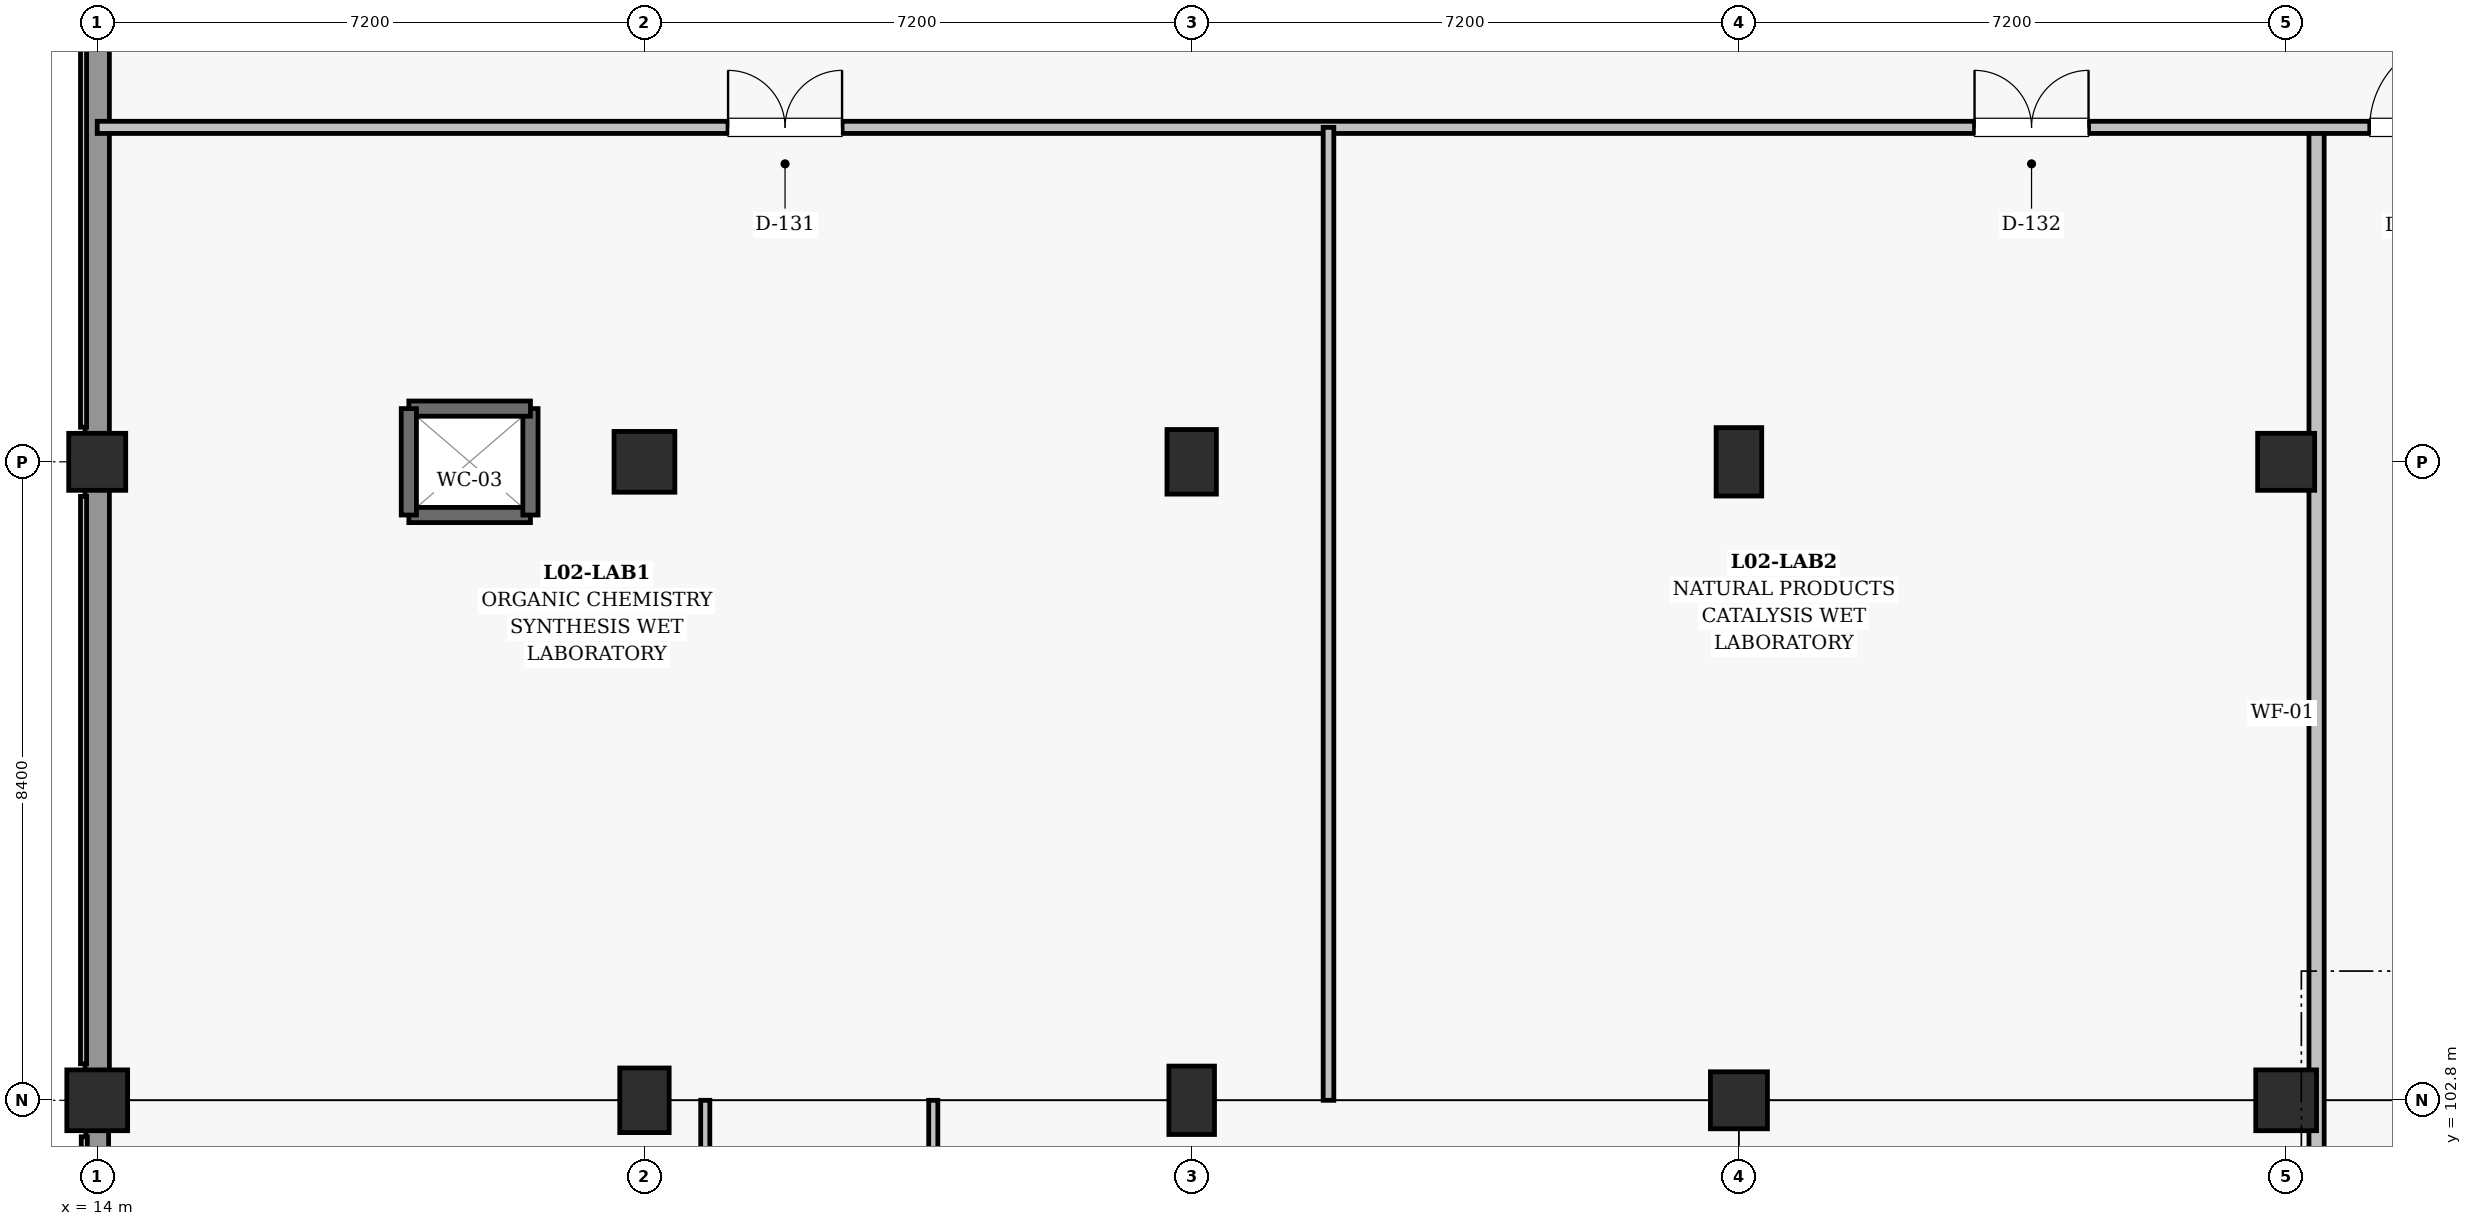
"""IFC4 building model, lengths in metres.
Left out: names, types, materials, properties, quantities, classifications, styles, units other than length and angle.
Written with IfcOpenShell. Run it as: python <this file> out.ifc"""

import sys

from ifc_helpers import new_model, si_unit, direction, frame, frame_2d, origin, origin_2d, place, context, subcontext, project, spatial, rectangle, extrude, element, fill, save


model = new_model("IFC4")
c1 = context("Model", 3, precision=1e-05, world=origin(), true_north=direction((0.0, 1.0)))
c2 = subcontext(c1, "Body", "Model", "MODEL_VIEW")
j1 = project(units=[si_unit("LENGTHUNIT", "METRE"), si_unit("PLANEANGLEUNIT", "RADIAN")], contexts=[c1])
p1 = place(None, origin())
s1 = spatial("IfcSite", under=j1, at=p1, CompositionType="ELEMENT")
p2 = place(p1, origin())
s2 = spatial("IfcBuilding", under=s1, at=p2, CompositionType="ELEMENT")
p3 = place(p2, frame((0.0, 0.0, 9.9)))
s3 = spatial("IfcBuildingStorey", under=s2, at=p3, CompositionType="ELEMENT", Elevation=9.9)
p4 = place(p3, frame((14.0, 102.8, 0.0), z_axis=(0.0, 0.0, 1.0), x_axis=(1.0, 0.0, 0.0)))
e1 = element("IfcColumn", 1, at=p4, inside=s3, PredefinedType="COLUMN", context=c2, shape_type="SweptSolid", body=[
    extrude(rectangle(XDim=0.8, YDim=0.8, at=origin_2d()), origin(), (0.0, 0.0, 1.0), 4.5),
])
p5 = place(p3, frame((14.0, 111.2, 0.0), z_axis=(0.0, 0.0, 1.0), x_axis=(1.0, 0.0, 0.0)))
e2 = element("IfcColumn", 2, at=p5, inside=s3, PredefinedType="COLUMN", context=c2, shape_type="SweptSolid", body=[
    extrude(rectangle(XDim=0.75, YDim=0.75, at=origin_2d()), origin(), (0.0, 0.0, 1.0), 4.5),
])
p6 = place(p3, frame((21.2, 102.8, 0.0), z_axis=(0.0, 0.0, 1.0), x_axis=(1.0, 0.0, 0.0)))
e3 = element("IfcColumn", 3, at=p6, inside=s3, PredefinedType="COLUMN", context=c2, shape_type="SweptSolid", body=[
    extrude(rectangle(XDim=0.65, YDim=0.85, at=origin_2d()), origin(), (0.0, 0.0, 1.0), 4.5),
])
p7 = place(p3, frame((21.2, 111.2, 0.0), z_axis=(0.0, 0.0, 1.0), x_axis=(1.0, 0.0, 0.0)))
e4 = element("IfcColumn", 4, at=p7, inside=s3, PredefinedType="COLUMN", context=c2, shape_type="SweptSolid", body=[
    extrude(rectangle(XDim=0.8, YDim=0.8, at=origin_2d()), origin(), (0.0, 0.0, 1.0), 4.5),
])
p8 = place(p3, frame((28.4, 102.8, 0.0), z_axis=(0.0, 0.0, 1.0), x_axis=(1.0, 0.0, 0.0)))
e5 = element("IfcColumn", 5, at=p8, inside=s3, PredefinedType="COLUMN", context=c2, shape_type="SweptSolid", body=[
    extrude(rectangle(XDim=0.6, YDim=0.9, at=origin_2d()), origin(), (0.0, 0.0, 1.0), 4.5),
])
p9 = place(p3, frame((28.4, 111.2, 0.0), z_axis=(0.0, 0.0, 1.0), x_axis=(1.0, 0.0, 0.0)))
e6 = element("IfcColumn", 6, at=p9, inside=s3, PredefinedType="COLUMN", context=c2, shape_type="SweptSolid", body=[
    extrude(rectangle(XDim=0.65, YDim=0.85, at=origin_2d()), origin(), (0.0, 0.0, 1.0), 4.5),
])
p10 = place(p3, frame((35.6, 102.8, 0.0), z_axis=(0.0, 0.0, 1.0), x_axis=(1.0, 0.0, 0.0)))
e7 = element("IfcColumn", 7, at=p10, inside=s3, PredefinedType="COLUMN", context=c2, shape_type="SweptSolid", body=[
    extrude(rectangle(XDim=0.75, YDim=0.75, at=origin_2d()), origin(), (0.0, 0.0, 1.0), 4.5),
])
p11 = place(p3, frame((35.6, 111.2, 0.0), z_axis=(0.0, 0.0, 1.0), x_axis=(1.0, 0.0, 0.0)))
e8 = element("IfcColumn", 8, at=p11, inside=s3, PredefinedType="COLUMN", context=c2, shape_type="SweptSolid", body=[
    extrude(rectangle(XDim=0.6, YDim=0.9, at=origin_2d()), origin(), (0.0, 0.0, 1.0), 4.5),
])
p12 = place(p3, frame((42.8, 102.8, 0.0), z_axis=(0.0, 0.0, 1.0), x_axis=(1.0, 0.0, 0.0)))
e9 = element("IfcColumn", 9, at=p12, inside=s3, PredefinedType="COLUMN", context=c2, shape_type="SweptSolid", body=[
    extrude(rectangle(XDim=0.8, YDim=0.8, at=origin_2d()), origin(), (0.0, 0.0, 1.0), 4.5),
])
p13 = place(p3, frame((42.8, 111.2, 0.0), z_axis=(0.0, 0.0, 1.0), x_axis=(1.0, 0.0, 0.0)))
e10 = element("IfcColumn", 10, at=p13, inside=s3, PredefinedType="COLUMN", context=c2, shape_type="SweptSolid", body=[
    extrude(rectangle(XDim=0.75, YDim=0.75, at=origin_2d()), origin(), (0.0, 0.0, 1.0), 4.5),
])
p14 = place(p3, frame((14.0, 103.18, 0.0), z_axis=(0.0, 0.0, 1.0), x_axis=(0.0, 1.0, 0.0)))
e11 = element("IfcWall", 11, at=p14, inside=s3, PredefinedType="SOLIDWALL", context=c2, shape_type="SweptSolid", body=[
    extrude(rectangle(XDim=7.665, YDim=0.32, at=frame_2d((3.833, 0.0))), origin(), (0.0, 0.0, 1.0), 3.355),
])
p15 = place(p3, frame((14.0, 111.555, 0.0), z_axis=(0.0, 0.0, 1.0), x_axis=(0.0, 1.0, 0.0)))
e12 = element("IfcWall", 12, at=p15, inside=s3, PredefinedType="SOLIDWALL", context=c2, shape_type="SweptSolid", body=[
    extrude(rectangle(XDim=7.69, YDim=0.32, at=frame_2d((3.845, 0.0))), origin(), (0.0, 0.0, 1.0), 3.405),
])
p16 = place(p3, frame((14.0, 94.73, 0.0), z_axis=(0.0, 0.0, 1.0), x_axis=(0.0, 1.0, 0.0)))
e13 = element("IfcWall", 13, at=p16, inside=s3, PredefinedType="SOLIDWALL", context=c2, shape_type="SweptSolid", body=[
    extrude(rectangle(XDim=7.69, YDim=0.3, at=frame_2d((3.845, 0.0))), origin(), (0.0, 0.0, 1.0), 3.355),
])
p17 = place(p3, frame((18.1, 110.5, 0.0), z_axis=(0.0, 0.0, 1.0), x_axis=(1.0, 0.0, 0.0)))
e14 = element("IfcWall", 14, at=p17, inside=s3, PredefinedType="SHEAR", context=c2, shape_type="SweptSolid", body=[
    extrude(rectangle(XDim=1.6, YDim=0.2, at=frame_2d((0.8, 0.0))), origin(), (0.0, 0.0, 1.0), 4.14),
])
p18 = place(p3, frame((19.7, 110.5, 0.0), z_axis=(0.0, 0.0, 1.0), x_axis=(0.0, 1.0, 0.0)))
e15 = element("IfcWall", 15, at=p18, inside=s3, PredefinedType="SHEAR", context=c2, shape_type="SweptSolid", body=[
    extrude(rectangle(XDim=1.4, YDim=0.2, at=frame_2d((0.7, 0.0))), origin(), (0.0, 0.0, 1.0), 4.14),
])
p19 = place(p3, frame((19.7, 111.9, 0.0), z_axis=(0.0, 0.0, 1.0), x_axis=(-1.0, 0.0, 0.0)))
e16 = element("IfcWall", 16, at=p19, inside=s3, PredefinedType="SHEAR", context=c2, shape_type="SweptSolid", body=[
    extrude(rectangle(XDim=1.6, YDim=0.2, at=frame_2d((0.8, 0.0))), origin(), (0.0, 0.0, 1.0), 4.14),
])
p20 = place(p3, frame((18.1, 111.9, 0.0), z_axis=(0.0, 0.0, 1.0), x_axis=(0.0, -1.0, 0.0)))
e17 = element("IfcWall", 17, at=p20, inside=s3, PredefinedType="SHEAR", context=c2, shape_type="SweptSolid", body=[
    extrude(rectangle(XDim=1.4, YDim=0.2, at=frame_2d((0.7, 0.0))), origin(), (0.0, 0.0, 1.0), 4.14),
])
p21 = place(p3, frame((43.2, 100.2, 0.0), z_axis=(0.0, 0.0, 1.0), x_axis=(0.0, 1.0, 0.0)))
e18 = element("IfcWall", 18, at=p21, inside=s3, PredefinedType="SOLIDWALL", context=c2, shape_type="SweptSolid", body=[
    extrude(rectangle(XDim=15.4, YDim=0.2, at=frame_2d((7.7, 0.0))), origin(), (0.0, 0.0, 1.0), 2.96),
])
p22 = place(p21, frame((0.45, 0.0, 0.0)))
e19 = element("IfcOpeningElement", 19, at=p22, cuts=e18, PredefinedType="OPENING", context=c2, shape_type="SweptSolid", body=[
    extrude(rectangle(XDim=1.1, YDim=2.15, at=frame_2d((0.55, 1.075))), frame((0.0, 0.11, 0.0), z_axis=(0.0, -1.0, 0.0), x_axis=(1.0, 0.0, 0.0)), (0.0, 0.0, 1.0), 0.22),
])
p23 = place(p3, frame((14.0, 115.6, 0.0), z_axis=(0.0, 0.0, 1.0), x_axis=(1.0, 0.0, 0.0)))
e20 = element("IfcWall", 20, at=p23, inside=s3, PredefinedType="PARTITIONING", context=c2, shape_type="SweptSolid", body=[
    extrude(rectangle(XDim=100.8, YDim=0.16, at=frame_2d((50.4, 0.0))), origin(), (0.0, 0.0, 1.0), 2.96),
])
p24 = place(p23, frame((29.9, 0.0, 0.0)))
e21 = element("IfcOpeningElement", 21, at=p24, cuts=e20, PredefinedType="OPENING", context=c2, shape_type="SweptSolid", body=[
    extrude(rectangle(XDim=1.18, YDim=2.2, at=frame_2d((0.59, 1.1))), frame((0.0, 0.09, 0.0), z_axis=(0.0, -1.0, 0.0), x_axis=(1.0, 0.0, 0.0)), (0.0, 0.0, 1.0), 0.18),
])
p25 = place(p23, frame((8.3, 0.0, 0.0)))
e22 = element("IfcOpeningElement", 22, at=p25, cuts=e20, PredefinedType="OPENING", context=c2, shape_type="SweptSolid", body=[
    extrude(rectangle(XDim=1.5, YDim=2.25, at=frame_2d((0.75, 1.125))), frame((0.0, 0.09, 0.0), z_axis=(0.0, -1.0, 0.0), x_axis=(1.0, 0.0, 0.0)), (0.0, 0.0, 1.0), 0.18),
])
p26 = place(p23, frame((24.7, 0.0, 0.0)))
e23 = element("IfcOpeningElement", 23, at=p26, cuts=e20, PredefinedType="OPENING", context=c2, shape_type="SweptSolid", body=[
    extrude(rectangle(XDim=1.5, YDim=2.25, at=frame_2d((0.75, 1.125))), frame((0.0, 0.09, 0.0), z_axis=(0.0, -1.0, 0.0), x_axis=(1.0, 0.0, 0.0)), (0.0, 0.0, 1.0), 0.18),
])
p27 = place(p23, frame((46.6, 0.0, 0.0)))
e24 = element("IfcOpeningElement", 24, at=p27, cuts=e20, PredefinedType="OPENING", context=c2, shape_type="SweptSolid", body=[
    extrude(rectangle(XDim=1.45, YDim=2.2, at=frame_2d((0.725, 1.1))), frame((0.0, 0.09, 0.0), z_axis=(0.0, -1.0, 0.0), x_axis=(1.0, 0.0, 0.0)), (0.0, 0.0, 1.0), 0.18),
])
p28 = place(p23, frame((70.2, 0.0, 0.0)))
e25 = element("IfcOpeningElement", 25, at=p28, cuts=e20, PredefinedType="OPENING", context=c2, shape_type="SweptSolid", body=[
    extrude(rectangle(XDim=1.5, YDim=2.25, at=frame_2d((0.75, 1.125))), frame((0.0, 0.09, 0.0), z_axis=(0.0, -1.0, 0.0), x_axis=(1.0, 0.0, 0.0)), (0.0, 0.0, 1.0), 0.18),
])
p29 = place(p23, frame((89.8, 0.0, 0.0)))
e26 = element("IfcOpeningElement", 26, at=p29, cuts=e20, PredefinedType="OPENING", context=c2, shape_type="SweptSolid", body=[
    extrude(rectangle(XDim=1.5, YDim=2.25, at=frame_2d((0.75, 1.125))), frame((0.0, 0.09, 0.0), z_axis=(0.0, -1.0, 0.0), x_axis=(1.0, 0.0, 0.0)), (0.0, 0.0, 1.0), 0.18),
])
p30 = place(p3, frame((30.2, 102.8, 0.0), z_axis=(0.0, 0.0, 1.0), x_axis=(0.0, 1.0, 0.0)))
e27 = element("IfcWall", 27, at=p30, inside=s3, PredefinedType="PARTITIONING", context=c2, shape_type="SweptSolid", body=[
    extrude(rectangle(XDim=12.8, YDim=0.14, at=frame_2d((6.4, 0.0))), origin(), (0.0, 0.0, 1.0), 3.41),
])
p31 = place(p3, frame((25.0, 36.0, 0.0), z_axis=(0.0, 0.0, 1.0), x_axis=(0.0, 1.0, 0.0)))
e28 = element("IfcWall", 28, at=p31, inside=s3, PredefinedType="PARTITIONING", context=c2, shape_type="SweptSolid", body=[
    extrude(rectangle(XDim=66.8, YDim=0.12, at=frame_2d((33.4, 0.0))), origin(), (0.0, 0.0, 1.0), 3.38),
])
p32 = place(p31, frame((10.0, 0.0, 0.0)))
e29 = element("IfcOpeningElement", 29, at=p32, cuts=e28, PredefinedType="OPENING", context=c2, shape_type="SweptSolid", body=[
    extrude(rectangle(XDim=1.18, YDim=2.2, at=frame_2d((0.59, 1.1))), frame((0.0, 0.07, 0.0), z_axis=(0.0, -1.0, 0.0), x_axis=(1.0, 0.0, 0.0)), (0.0, 0.0, 1.0), 0.14),
])
p33 = place(p31, frame((30.5, 0.0, 0.0)))
e30 = element("IfcOpeningElement", 30, at=p33, cuts=e28, PredefinedType="OPENING", context=c2, shape_type="SweptSolid", body=[
    extrude(rectangle(XDim=1.25, YDim=2.2, at=frame_2d((0.625, 1.1))), frame((0.0, 0.07, 0.0), z_axis=(0.0, -1.0, 0.0), x_axis=(1.0, 0.0, 0.0)), (0.0, 0.0, 1.0), 0.14),
])
p34 = place(p31, frame((53.7, 0.0, 0.0)))
e31 = element("IfcOpeningElement", 31, at=p34, cuts=e28, PredefinedType="OPENING", context=c2, shape_type="SweptSolid", body=[
    extrude(rectangle(XDim=1.35, YDim=2.2, at=frame_2d((0.675, 1.1))), frame((0.0, 0.07, 0.0), z_axis=(0.0, -1.0, 0.0), x_axis=(1.0, 0.0, 0.0)), (0.0, 0.0, 1.0), 0.14),
])
p35 = place(p3, frame((22.0, 63.2, 0.0), z_axis=(0.0, 0.0, 1.0), x_axis=(0.0, 1.0, 0.0)))
e32 = element("IfcWall", 32, at=p35, inside=s3, PredefinedType="PARTITIONING", context=c2, shape_type="SweptSolid", body=[
    extrude(rectangle(XDim=39.6, YDim=0.12, at=frame_2d((19.8, 0.0))), origin(), (0.0, 0.0, 1.0), 3.38),
])
p36 = place(p35, frame((11.3, 0.0, 0.0)))
e33 = element("IfcOpeningElement", 33, at=p36, cuts=e32, PredefinedType="OPENING", context=c2, shape_type="SweptSolid", body=[
    extrude(rectangle(XDim=1.25, YDim=2.2, at=frame_2d((0.625, 1.1))), frame((0.0, 0.07, 0.0), z_axis=(0.0, -1.0, 0.0), x_axis=(1.0, 0.0, 0.0)), (0.0, 0.0, 1.0), 0.14),
])
p37 = place(p35, frame((26.3, 0.0, 0.0)))
e34 = element("IfcOpeningElement", 34, at=p37, cuts=e32, PredefinedType="OPENING", context=c2, shape_type="SweptSolid", body=[
    extrude(rectangle(XDim=1.35, YDim=2.2, at=frame_2d((0.675, 1.1))), frame((0.0, 0.07, 0.0), z_axis=(0.0, -1.0, 0.0), x_axis=(1.0, 0.0, 0.0)), (0.0, 0.0, 1.0), 0.14),
])
p38 = place(p24, origin())
e35 = element("IfcDoor", 35, at=p38, inside=s3, OperationType="SINGLE_SWING_RIGHT", PredefinedType="DOOR", context=c2, shape_type="SweptSolid", body=[
    extrude(rectangle(XDim=1.18, YDim=2.2, at=frame_2d((0.59, 1.1))), frame((0.0, 0.025, 0.0), z_axis=(0.0, -1.0, 0.0), x_axis=(1.0, 0.0, 0.0)), (0.0, 0.0, 1.0), 0.05),
])
fill(e21, e35)
p39 = place(p25, origin())
e36 = element("IfcDoor", 36, at=p39, inside=s3, OperationType="DOUBLE_DOOR_SINGLE_SWING", PredefinedType="DOOR", context=c2, shape_type="SweptSolid", body=[
    extrude(rectangle(XDim=1.5, YDim=2.25, at=frame_2d((0.75, 1.125))), frame((0.0, 0.025, 0.0), z_axis=(0.0, -1.0, 0.0), x_axis=(1.0, 0.0, 0.0)), (0.0, 0.0, 1.0), 0.05),
])
fill(e22, e36)
p40 = place(p26, origin())
e37 = element("IfcDoor", 37, at=p40, inside=s3, OperationType="DOUBLE_DOOR_SINGLE_SWING", PredefinedType="DOOR", context=c2, shape_type="SweptSolid", body=[
    extrude(rectangle(XDim=1.5, YDim=2.25, at=frame_2d((0.75, 1.125))), frame((0.0, 0.025, 0.0), z_axis=(0.0, -1.0, 0.0), x_axis=(1.0, 0.0, 0.0)), (0.0, 0.0, 1.0), 0.05),
])
fill(e23, e37)
save(model, sys.argv[1])
